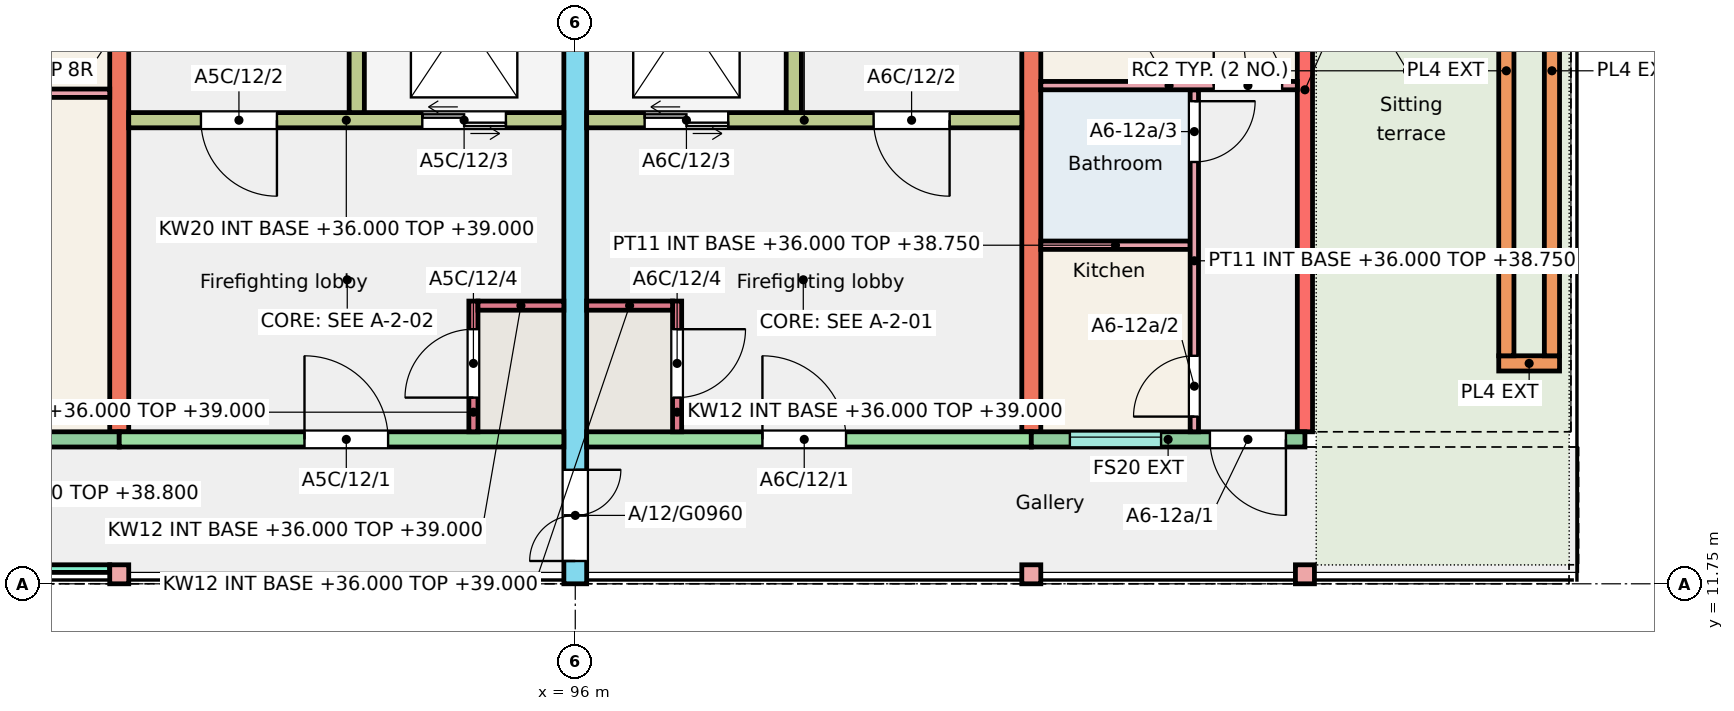
"""IFC4 building model, lengths in metres.
Left out: names, types, materials, properties, quantities, classifications, styles, units other than length and angle.
Written with IfcOpenShell. Run it as: python <this file> out.ifc"""

import sys

from ifc_helpers import new_model, si_unit, direction, frame, frame_2d, origin, origin_2d, place, context, subcontext, project, spatial, rectangle, extrude, element, fill, save


model = new_model("IFC4")
c1 = context("Model", 3, precision=1e-05, world=origin(), true_north=direction((0.0, 1.0)))
c2 = subcontext(c1, "Body", "Model", "MODEL_VIEW")
j1 = project(units=[si_unit("LENGTHUNIT", "METRE"), si_unit("PLANEANGLEUNIT", "RADIAN")], contexts=[c1])
p1 = place(None, origin())
s1 = spatial("IfcSite", under=j1, at=p1, CompositionType="ELEMENT")
p2 = place(p1, origin())
s2 = spatial("IfcBuilding", under=s1, at=p2, CompositionType="ELEMENT")
p3 = place(p2, frame((0.0, 0.0, 36.0)))
s3 = spatial("IfcBuildingStorey", under=s2, at=p3, CompositionType="ELEMENT", Elevation=36.0)
p4 = place(p3, frame((90.0, 13.75, 0.0), z_axis=(0.0, 0.0, 1.0), x_axis=(0.0, 1.0, 0.0)))
e1 = element("IfcWall", 1, at=p4, inside=s3, PredefinedType="SHEAR", context=c2, shape_type="SweptSolid", body=[
    extrude(rectangle(XDim=9.0, YDim=0.25, at=frame_2d((4.5, 0.0))), origin(), (0.0, 0.0, 1.0), 3.0),
])
p5 = place(p3, frame((96.0, 11.75, 0.0), z_axis=(0.0, 0.0, 1.0), x_axis=(0.0, 1.0, 0.0)))
e2 = element("IfcWall", 2, at=p5, inside=s3, PredefinedType="SHEAR", context=c2, shape_type="SweptSolid", body=[
    extrude(rectangle(XDim=11.0, YDim=0.3, at=frame_2d((5.5, 0.0))), origin(), (0.0, 0.0, 1.0), 3.0),
])
p6 = place(p5, frame((0.3, 0.0, 0.0)))
e3 = element("IfcOpeningElement", 3, at=p6, cuts=e2, PredefinedType="OPENING", context=c2, shape_type="SweptSolid", body=[
    extrude(rectangle(XDim=1.2, YDim=2.1, at=frame_2d((0.6, 1.05))), frame((0.0, 0.16, 0.0), z_axis=(0.0, -1.0, 0.0), x_axis=(1.0, 0.0, 0.0)), (0.0, 0.0, 1.0), 0.32),
])
p7 = place(p3, frame((102.0, 13.75, 0.0), z_axis=(0.0, 0.0, 1.0), x_axis=(0.0, 1.0, 0.0)))
e4 = element("IfcWall", 4, at=p7, inside=s3, PredefinedType="SHEAR", context=c2, shape_type="SweptSolid", body=[
    extrude(rectangle(XDim=9.0, YDim=0.25, at=frame_2d((4.5, 0.0))), origin(), (0.0, 0.0, 1.0), 3.0),
])
p8 = place(p3, frame((105.6, 13.75, 0.0), z_axis=(0.0, 0.0, 1.0), x_axis=(0.0, 1.0, 0.0)))
e5 = element("IfcWall", 5, at=p8, inside=s3, PredefinedType="SHEAR", context=c2, shape_type="SweptSolid", body=[
    extrude(rectangle(XDim=9.0, YDim=0.2, at=frame_2d((4.5, 0.0))), origin(), (0.0, 0.0, 1.0), 3.0),
])
p9 = place(p8, frame((7.603, 0.0, 0.9)))
e6 = element("IfcOpeningElement", 6, at=p9, cuts=e5, PredefinedType="OPENING", context=c2, shape_type="SweptSolid", body=[
    extrude(rectangle(XDim=1.2, YDim=1.5, at=frame_2d((0.6, 0.75))), frame((0.0, 0.11, 0.0), z_axis=(0.0, -1.0, 0.0), x_axis=(1.0, 0.0, 0.0)), (0.0, 0.0, 1.0), 0.22),
])
p10 = place(p8, frame((6.305, 0.0, 0.0)))
e7 = element("IfcOpeningElement", 7, at=p10, cuts=e5, PredefinedType="OPENING", context=c2, shape_type="SweptSolid", body=[
    extrude(rectangle(XDim=1.0, YDim=2.1, at=frame_2d((0.5, 1.05))), frame((0.0, 0.11, 0.0), z_axis=(0.0, -1.0, 0.0), x_axis=(1.0, 0.0, 0.0)), (0.0, 0.0, 1.0), 0.22),
])
p11 = place(p3, frame((86.4, 13.65, 0.0), z_axis=(0.0, 0.0, 1.0), x_axis=(1.0, 0.0, 0.0)))
e8 = element("IfcWall", 8, at=p11, inside=s3, PredefinedType="SOLIDWALL", context=c2, shape_type="SweptSolid", body=[
    extrude(rectangle(XDim=3.6, YDim=0.2, at=frame_2d((1.8, 0.0))), origin(), (0.0, 0.0, 1.0), 3.0),
])
p12 = place(p11, frame((1.188, 0.0, 0.8)))
e9 = element("IfcOpeningElement", 9, at=p12, cuts=e8, PredefinedType="OPENING", context=c2, shape_type="SweptSolid", body=[
    extrude(rectangle(XDim=1.2, YDim=1.6, at=frame_2d((0.6, 0.8))), frame((0.0, 0.11, 0.0), z_axis=(0.0, -1.0, 0.0), x_axis=(1.0, 0.0, 0.0)), (0.0, 0.0, 1.0), 0.22),
])
p13 = place(p3, frame((90.0, 13.65, 0.0), z_axis=(0.0, 0.0, 1.0), x_axis=(1.0, 0.0, 0.0)))
e10 = element("IfcWall", 10, at=p13, inside=s3, PredefinedType="SHEAR", context=c2, shape_type="SweptSolid", body=[
    extrude(rectangle(XDim=5.85, YDim=0.2, at=frame_2d((2.925, 0.0))), origin(), (0.0, 0.0, 1.0), 3.0),
])
p14 = place(p13, frame((2.438, 0.0, 0.0)))
e11 = element("IfcOpeningElement", 11, at=p14, cuts=e10, PredefinedType="OPENING", context=c2, shape_type="SweptSolid", body=[
    extrude(rectangle(XDim=1.1, YDim=2.1, at=frame_2d((0.55, 1.05))), frame((0.0, 0.11, 0.0), z_axis=(0.0, -1.0, 0.0), x_axis=(1.0, 0.0, 0.0)), (0.0, 0.0, 1.0), 0.22),
])
p15 = place(p3, frame((90.125, 17.85, 0.0), z_axis=(0.0, 0.0, 1.0), x_axis=(1.0, 0.0, 0.0)))
e12 = element("IfcWall", 12, at=p15, inside=s3, PredefinedType="SHEAR", context=c2, shape_type="SweptSolid", body=[
    extrude(rectangle(XDim=5.725, YDim=0.2, at=frame_2d((2.863, 0.0))), origin(), (0.0, 0.0, 1.0), 3.0),
])
p16 = place(p15, frame((0.95, 0.0, 0.0)))
e13 = element("IfcOpeningElement", 13, at=p16, cuts=e12, PredefinedType="OPENING", context=c2, shape_type="SweptSolid", body=[
    extrude(rectangle(XDim=1.0, YDim=2.1, at=frame_2d((0.5, 1.05))), frame((0.0, 0.11, 0.0), z_axis=(0.0, -1.0, 0.0), x_axis=(1.0, 0.0, 0.0)), (0.0, 0.0, 1.0), 0.22),
])
p17 = place(p15, frame((3.863, 0.0, 0.0)))
e14 = element("IfcOpeningElement", 14, at=p17, cuts=e12, PredefinedType="OPENING", context=c2, shape_type="SweptSolid", body=[
    extrude(rectangle(XDim=1.1, YDim=2.1, at=frame_2d((0.55, 1.05))), frame((0.0, 0.11, 0.0), z_axis=(0.0, -1.0, 0.0), x_axis=(1.0, 0.0, 0.0)), (0.0, 0.0, 1.0), 0.22),
])
p18 = place(p3, frame((93.125, 17.95, 0.0), z_axis=(0.0, 0.0, 1.0), x_axis=(0.0, 1.0, 0.0)))
e15 = element("IfcWall", 15, at=p18, inside=s3, PredefinedType="SHEAR", context=c2, shape_type="SweptSolid", body=[
    extrude(rectangle(XDim=4.8, YDim=0.2, at=frame_2d((2.4, 0.0))), origin(), (0.0, 0.0, 1.0), 3.0),
])
p19 = place(p3, frame((94.66, 13.75, 0.0), z_axis=(0.0, 0.0, 1.0), x_axis=(0.0, 1.0, 0.0)))
e16 = element("IfcWall", 16, at=p19, inside=s3, PredefinedType="SHEAR", context=c2, shape_type="SweptSolid", body=[
    extrude(rectangle(XDim=1.72, YDim=0.12, at=frame_2d((0.86, 0.0))), origin(), (0.0, 0.0, 1.0), 3.0),
])
p20 = place(p19, frame((0.45, 0.0, 0.0)))
e17 = element("IfcOpeningElement", 17, at=p20, cuts=e16, PredefinedType="OPENING", context=c2, shape_type="SweptSolid", body=[
    extrude(rectangle(XDim=0.9, YDim=2.1, at=frame_2d((0.45, 1.05))), frame((0.0, 0.07, 0.0), z_axis=(0.0, -1.0, 0.0), x_axis=(1.0, 0.0, 0.0)), (0.0, 0.0, 1.0), 0.14),
])
p21 = place(p3, frame((94.72, 15.41, 0.0), z_axis=(0.0, 0.0, 1.0), x_axis=(1.0, 0.0, 0.0)))
e18 = element("IfcWall", 18, at=p21, inside=s3, PredefinedType="SHEAR", context=c2, shape_type="SweptSolid", body=[
    extrude(rectangle(XDim=1.13, YDim=0.12, at=frame_2d((0.565, 0.0))), origin(), (0.0, 0.0, 1.0), 3.0),
])
p22 = place(p3, frame((96.15, 13.65, 0.0), z_axis=(0.0, 0.0, 1.0), x_axis=(1.0, 0.0, 0.0)))
e19 = element("IfcWall", 19, at=p22, inside=s3, PredefinedType="SHEAR", context=c2, shape_type="SweptSolid", body=[
    extrude(rectangle(XDim=5.85, YDim=0.2, at=frame_2d((2.925, 0.0))), origin(), (0.0, 0.0, 1.0), 3.0),
])
p23 = place(p22, frame((2.312, 0.0, 0.0)))
e20 = element("IfcOpeningElement", 20, at=p23, cuts=e19, PredefinedType="OPENING", context=c2, shape_type="SweptSolid", body=[
    extrude(rectangle(XDim=1.1, YDim=2.1, at=frame_2d((0.55, 1.05))), frame((0.0, 0.11, 0.0), z_axis=(0.0, -1.0, 0.0), x_axis=(1.0, 0.0, 0.0)), (0.0, 0.0, 1.0), 0.22),
])
p24 = place(p3, frame((96.15, 17.85, 0.0), z_axis=(0.0, 0.0, 1.0), x_axis=(1.0, 0.0, 0.0)))
e21 = element("IfcWall", 21, at=p24, inside=s3, PredefinedType="SHEAR", context=c2, shape_type="SweptSolid", body=[
    extrude(rectangle(XDim=5.725, YDim=0.2, at=frame_2d((2.863, 0.0))), origin(), (0.0, 0.0, 1.0), 3.0),
])
p25 = place(p24, frame((3.775, 0.0, 0.0)))
e22 = element("IfcOpeningElement", 22, at=p25, cuts=e21, PredefinedType="OPENING", context=c2, shape_type="SweptSolid", body=[
    extrude(rectangle(XDim=1.0, YDim=2.1, at=frame_2d((0.5, 1.05))), frame((0.0, 0.11, 0.0), z_axis=(0.0, -1.0, 0.0), x_axis=(1.0, 0.0, 0.0)), (0.0, 0.0, 1.0), 0.22),
])
p26 = place(p24, frame((0.762, 0.0, 0.0)))
e23 = element("IfcOpeningElement", 23, at=p26, cuts=e21, PredefinedType="OPENING", context=c2, shape_type="SweptSolid", body=[
    extrude(rectangle(XDim=1.1, YDim=2.1, at=frame_2d((0.55, 1.05))), frame((0.0, 0.11, 0.0), z_axis=(0.0, -1.0, 0.0), x_axis=(1.0, 0.0, 0.0)), (0.0, 0.0, 1.0), 0.22),
])
p27 = place(p3, frame((98.875, 17.95, 0.0), z_axis=(0.0, 0.0, 1.0), x_axis=(0.0, 1.0, 0.0)))
e24 = element("IfcWall", 24, at=p27, inside=s3, PredefinedType="SHEAR", context=c2, shape_type="SweptSolid", body=[
    extrude(rectangle(XDim=4.8, YDim=0.2, at=frame_2d((2.4, 0.0))), origin(), (0.0, 0.0, 1.0), 3.0),
])
p28 = place(p3, frame((97.34, 13.75, 0.0), z_axis=(0.0, 0.0, 1.0), x_axis=(0.0, 1.0, 0.0)))
e25 = element("IfcWall", 25, at=p28, inside=s3, PredefinedType="SHEAR", context=c2, shape_type="SweptSolid", body=[
    extrude(rectangle(XDim=1.72, YDim=0.12, at=frame_2d((0.86, 0.0))), origin(), (0.0, 0.0, 1.0), 3.0),
])
p29 = place(p28, frame((0.45, 0.0, 0.0)))
e26 = element("IfcOpeningElement", 26, at=p29, cuts=e25, PredefinedType="OPENING", context=c2, shape_type="SweptSolid", body=[
    extrude(rectangle(XDim=0.9, YDim=2.1, at=frame_2d((0.45, 1.05))), frame((0.0, 0.07, 0.0), z_axis=(0.0, -1.0, 0.0), x_axis=(1.0, 0.0, 0.0)), (0.0, 0.0, 1.0), 0.14),
])
p30 = place(p3, frame((96.15, 15.41, 0.0), z_axis=(0.0, 0.0, 1.0), x_axis=(1.0, 0.0, 0.0)))
e27 = element("IfcWall", 27, at=p30, inside=s3, PredefinedType="SHEAR", context=c2, shape_type="SweptSolid", body=[
    extrude(rectangle(XDim=1.13, YDim=0.12, at=frame_2d((0.565, 0.0))), origin(), (0.0, 0.0, 1.0), 3.0),
])
p31 = place(p3, frame((102.0, 13.65, 0.0), z_axis=(0.0, 0.0, 1.0), x_axis=(1.0, 0.0, 0.0)))
e28 = element("IfcWall", 28, at=p31, inside=s3, PredefinedType="SOLIDWALL", context=c2, shape_type="SweptSolid", body=[
    extrude(rectangle(XDim=3.6, YDim=0.2, at=frame_2d((1.8, 0.0))), origin(), (0.0, 0.0, 1.0), 3.0),
])
p32 = place(p31, frame((0.508, 0.0, 1.1)))
e29 = element("IfcOpeningElement", 29, at=p32, cuts=e28, PredefinedType="OPENING", context=c2, shape_type="SweptSolid", body=[
    extrude(rectangle(XDim=1.2, YDim=1.3, at=frame_2d((0.6, 0.65))), frame((0.0, 0.11, 0.0), z_axis=(0.0, -1.0, 0.0), x_axis=(1.0, 0.0, 0.0)), (0.0, 0.0, 1.0), 0.22),
])
p33 = place(p31, frame((2.35, 0.0, 0.0)))
e30 = element("IfcOpeningElement", 30, at=p33, cuts=e28, PredefinedType="OPENING", context=c2, shape_type="SweptSolid", body=[
    extrude(rectangle(XDim=1.0, YDim=2.1, at=frame_2d((0.5, 1.05))), frame((0.0, 0.11, 0.0), z_axis=(0.0, -1.0, 0.0), x_axis=(1.0, 0.0, 0.0)), (0.0, 0.0, 1.0), 0.22),
])
for number, where, z_axis, x_axis in (
    (31, (90.0, 11.875, 0.0), (0.0, 0.0, 1.0), (1.0, 0.0, 0.0)),
    (32, (102.0, 11.875, 0.0), (0.0, 0.0, 1.0), (1.0, 0.0, 0.0)),
    (33, (105.6, 11.875, 0.0), (0.0, 0.0, 1.0), (1.0, 0.0, 0.0)),
):
    element("IfcColumn", number, at=place(p3, frame(where, z_axis=z_axis, x_axis=x_axis)), inside=s3, PredefinedType="COLUMN", context=c2, shape_type="SweptSolid", body=[
        extrude(rectangle(XDim=0.25, YDim=0.25, at=origin_2d()), origin(), (0.0, 0.0, 1.0), 3.0),
    ])
p34 = place(p3, frame((108.15, 14.65, 0.01), z_axis=(0.0, 0.0, 1.0), x_axis=(1.0, 0.0, 0.0)))
e34 = element("IfcWall", 34, at=p34, inside=s3, PredefinedType="SOLIDWALL", context=c2, shape_type="SweptSolid", body=[
    extrude(rectangle(XDim=0.8, YDim=0.2, at=frame_2d((0.4, 0.0))), origin(), (0.0, 0.0, 1.0), 0.45),
])
for number, where, z_axis, x_axis in (
    (35, (108.25, 14.75, 0.01), (0.0, 0.0, 1.0), (0.0, 1.0, 0.0)),
    (36, (108.85, 14.75, 0.01), (0.0, 0.0, 1.0), (0.0, 1.0, 0.0)),
):
    element("IfcWall", number, at=place(p3, frame(where, z_axis=z_axis, x_axis=x_axis)), inside=s3, PredefinedType="SOLIDWALL", context=c2, shape_type="SweptSolid", body=[
        extrude(rectangle(XDim=7.5, YDim=0.2, at=frame_2d((3.75, 0.0))), origin(), (0.0, 0.0, 1.0), 0.45),
    ])
p35 = place(p3, frame((86.525, 11.95, 0.0), z_axis=(0.0, 0.0, 1.0), x_axis=(1.0, 0.0, 0.0)))
e37 = element("IfcWall", 37, at=p35, inside=s3, PredefinedType="SOLIDWALL", context=c2, shape_type="SweptSolid", body=[
    extrude(rectangle(XDim=3.35, YDim=0.1, at=frame_2d((1.675, 0.0))), origin(), (0.0, 0.0, 1.0), 2.45),
])
p36 = place(p3, frame((86.5, 18.205, 0.0), z_axis=(0.0, 0.0, 1.0), x_axis=(1.0, 0.0, 0.0)))
e38 = element("IfcWall", 38, at=p36, inside=s3, PredefinedType="PARTITIONING", context=c2, shape_type="SweptSolid", body=[
    extrude(rectangle(XDim=3.375, YDim=0.11, at=frame_2d((1.688, 0.0))), origin(), (0.0, 0.0, 1.0), 2.8),
])
p37 = place(p3, frame((102.125, 16.205, 0.0), z_axis=(0.0, 0.0, 1.0), x_axis=(1.0, 0.0, 0.0)))
e39 = element("IfcWall", 39, at=p37, inside=s3, PredefinedType="PARTITIONING", context=c2, shape_type="SweptSolid", body=[
    extrude(rectangle(XDim=1.965, YDim=0.11, at=frame_2d((0.982, 0.0))), origin(), (0.0, 0.0, 1.0), 2.75),
])
p38 = place(p3, frame((104.145, 13.75, 0.0), z_axis=(0.0, 0.0, 1.0), x_axis=(0.0, 1.0, 0.0)))
e40 = element("IfcWall", 40, at=p38, inside=s3, PredefinedType="PARTITIONING", context=c2, shape_type="SweptSolid", body=[
    extrude(rectangle(XDim=4.5, YDim=0.11, at=frame_2d((2.25, 0.0))), origin(), (0.0, 0.0, 1.0), 2.75),
])
p39 = place(p38, frame((0.2, 0.0, 0.0)))
e41 = element("IfcOpeningElement", 41, at=p39, cuts=e40, PredefinedType="OPENING", context=c2, shape_type="SweptSolid", body=[
    extrude(rectangle(XDim=0.8, YDim=2.1, at=frame_2d((0.4, 1.05))), frame((0.0, 0.065, 0.0), z_axis=(0.0, -1.0, 0.0), x_axis=(1.0, 0.0, 0.0)), (0.0, 0.0, 1.0), 0.13),
])
p40 = place(p38, frame((3.55, 0.0, 0.0)))
e42 = element("IfcOpeningElement", 42, at=p40, cuts=e40, PredefinedType="OPENING", context=c2, shape_type="SweptSolid", body=[
    extrude(rectangle(XDim=0.8, YDim=2.1, at=frame_2d((0.4, 1.05))), frame((0.0, 0.065, 0.0), z_axis=(0.0, -1.0, 0.0), x_axis=(1.0, 0.0, 0.0)), (0.0, 0.0, 1.0), 0.13),
])
p41 = place(p3, frame((102.125, 18.305, 0.0), z_axis=(0.0, 0.0, 1.0), x_axis=(1.0, 0.0, 0.0)))
e43 = element("IfcWall", 43, at=p41, inside=s3, PredefinedType="PARTITIONING", context=c2, shape_type="SweptSolid", body=[
    extrude(rectangle(XDim=3.375, YDim=0.11, at=frame_2d((1.688, 0.0))), origin(), (0.0, 0.0, 1.0), 2.75),
])
p42 = place(p41, frame((2.275, 0.0, 0.0)))
e44 = element("IfcOpeningElement", 44, at=p42, cuts=e43, PredefinedType="OPENING", context=c2, shape_type="SweptSolid", body=[
    extrude(rectangle(XDim=0.9, YDim=2.1, at=frame_2d((0.45, 1.05))), frame((0.0, 0.065, 0.0), z_axis=(0.0, -1.0, 0.0), x_axis=(1.0, 0.0, 0.0)), (0.0, 0.0, 1.0), 0.13),
])
p43 = place(p32, origin())
e45 = element("IfcWindow", 45, at=p43, inside=s3, PartitioningType="SINGLE_PANEL", PredefinedType="WINDOW", context=c2, shape_type="SweptSolid", body=[
    extrude(rectangle(XDim=1.2, YDim=1.3, at=frame_2d((0.6, 0.65))), frame((0.0, 0.06, 0.0), z_axis=(0.0, -1.0, 0.0), x_axis=(1.0, 0.0, 0.0)), (0.0, 0.0, 1.0), 0.06),
])
fill(e29, e45)
p44 = place(p33, origin())
e46 = element("IfcDoor", 46, at=p44, inside=s3, OperationType="SINGLE_SWING_RIGHT", PredefinedType="DOOR", context=c2, shape_type="SweptSolid", body=[
    extrude(rectangle(XDim=1.0, YDim=2.1, at=frame_2d((0.5, 1.05))), frame((0.0, 0.025, 0.0), z_axis=(0.0, -1.0, 0.0), x_axis=(1.0, 0.0, 0.0)), (0.0, 0.0, 1.0), 0.05),
])
fill(e30, e46)
p45 = place(p39, origin())
e47 = element("IfcDoor", 47, at=p45, inside=s3, OperationType="SINGLE_SWING_LEFT", PredefinedType="DOOR", context=c2, shape_type="SweptSolid", body=[
    extrude(rectangle(XDim=0.8, YDim=2.1, at=frame_2d((0.4, 1.05))), frame((0.0, 0.025, 0.0), z_axis=(0.0, -1.0, 0.0), x_axis=(1.0, 0.0, 0.0)), (0.0, 0.0, 1.0), 0.05),
])
fill(e41, e47)
p46 = place(p40, origin())
e48 = element("IfcDoor", 48, at=p46, inside=s3, OperationType="SINGLE_SWING_RIGHT", PredefinedType="DOOR", context=c2, shape_type="SweptSolid", body=[
    extrude(rectangle(XDim=0.8, YDim=2.1, at=frame_2d((0.4, 1.05))), frame((0.0, 0.025, 0.0), z_axis=(0.0, -1.0, 0.0), x_axis=(1.0, 0.0, 0.0)), (0.0, 0.0, 1.0), 0.05),
])
fill(e42, e48)
p47 = place(p42, origin())
e49 = element("IfcDoor", 49, at=p47, inside=s3, OperationType="SINGLE_SWING_LEFT", PredefinedType="DOOR", context=c2, shape_type="SweptSolid", body=[
    extrude(rectangle(XDim=0.9, YDim=2.1, at=frame_2d((0.45, 1.05))), frame((0.0, 0.025, 0.0), z_axis=(0.0, -1.0, 0.0), x_axis=(1.0, 0.0, 0.0)), (0.0, 0.0, 1.0), 0.05),
])
fill(e44, e49)
p48 = place(p14, origin())
e50 = element("IfcDoor", 50, at=p48, inside=s3, OperationType="SINGLE_SWING_LEFT", PredefinedType="DOOR", context=c2, shape_type="SweptSolid", body=[
    extrude(rectangle(XDim=1.1, YDim=2.1, at=frame_2d((0.55, 1.05))), frame((0.0, 0.025, 0.0), z_axis=(0.0, -1.0, 0.0), x_axis=(1.0, 0.0, 0.0)), (0.0, 0.0, 1.0), 0.05),
])
fill(e11, e50)
p49 = place(p16, origin())
e51 = element("IfcDoor", 51, at=p49, inside=s3, OperationType="SINGLE_SWING_RIGHT", PredefinedType="DOOR", context=c2, shape_type="SweptSolid", body=[
    extrude(rectangle(XDim=1.0, YDim=2.1, at=frame_2d((0.5, 1.05))), frame((0.0, 0.025, 0.0), z_axis=(0.0, -1.0, 0.0), x_axis=(1.0, 0.0, 0.0)), (0.0, 0.0, 1.0), 0.05),
])
fill(e13, e51)
p50 = place(p17, origin())
e52 = element("IfcDoor", 52, at=p50, inside=s3, OperationType="DOUBLE_DOOR_SLIDING", PredefinedType="DOOR", context=c2, shape_type="SweptSolid", body=[
    extrude(rectangle(XDim=1.1, YDim=2.1, at=frame_2d((0.55, 1.05))), frame((0.0, 0.025, 0.0), z_axis=(0.0, -1.0, 0.0), x_axis=(1.0, 0.0, 0.0)), (0.0, 0.0, 1.0), 0.05),
])
fill(e14, e52)
p51 = place(p20, origin())
e53 = element("IfcDoor", 53, at=p51, inside=s3, OperationType="SINGLE_SWING_LEFT", PredefinedType="DOOR", context=c2, shape_type="SweptSolid", body=[
    extrude(rectangle(XDim=0.9, YDim=2.1, at=frame_2d((0.45, 1.05))), frame((0.0, 0.025, 0.0), z_axis=(0.0, -1.0, 0.0), x_axis=(1.0, 0.0, 0.0)), (0.0, 0.0, 1.0), 0.05),
])
fill(e17, e53)
p52 = place(p23, origin())
e54 = element("IfcDoor", 54, at=p52, inside=s3, OperationType="SINGLE_SWING_LEFT", PredefinedType="DOOR", context=c2, shape_type="SweptSolid", body=[
    extrude(rectangle(XDim=1.1, YDim=2.1, at=frame_2d((0.55, 1.05))), frame((0.0, 0.025, 0.0), z_axis=(0.0, -1.0, 0.0), x_axis=(1.0, 0.0, 0.0)), (0.0, 0.0, 1.0), 0.05),
])
fill(e20, e54)
p53 = place(p25, origin())
e55 = element("IfcDoor", 55, at=p53, inside=s3, OperationType="SINGLE_SWING_RIGHT", PredefinedType="DOOR", context=c2, shape_type="SweptSolid", body=[
    extrude(rectangle(XDim=1.0, YDim=2.1, at=frame_2d((0.5, 1.05))), frame((0.0, 0.025, 0.0), z_axis=(0.0, -1.0, 0.0), x_axis=(1.0, 0.0, 0.0)), (0.0, 0.0, 1.0), 0.05),
])
fill(e22, e55)
p54 = place(p26, origin())
e56 = element("IfcDoor", 56, at=p54, inside=s3, OperationType="DOUBLE_DOOR_SLIDING", PredefinedType="DOOR", context=c2, shape_type="SweptSolid", body=[
    extrude(rectangle(XDim=1.1, YDim=2.1, at=frame_2d((0.55, 1.05))), frame((0.0, 0.025, 0.0), z_axis=(0.0, -1.0, 0.0), x_axis=(1.0, 0.0, 0.0)), (0.0, 0.0, 1.0), 0.05),
])
fill(e23, e56)
p55 = place(p29, origin())
e57 = element("IfcDoor", 57, at=p55, inside=s3, OperationType="SINGLE_SWING_RIGHT", PredefinedType="DOOR", context=c2, shape_type="SweptSolid", body=[
    extrude(rectangle(XDim=0.9, YDim=2.1, at=frame_2d((0.45, 1.05))), frame((0.0, 0.025, 0.0), z_axis=(0.0, -1.0, 0.0), x_axis=(1.0, 0.0, 0.0)), (0.0, 0.0, 1.0), 0.05),
])
fill(e26, e57)
p56 = place(p6, origin())
e58 = element("IfcDoor", 58, at=p56, inside=s3, OperationType="DOUBLE_DOOR_SINGLE_SWING", PredefinedType="DOOR", context=c2, shape_type="SweptSolid", body=[
    extrude(rectangle(XDim=1.2, YDim=2.1, at=frame_2d((0.6, 1.05))), frame((0.0, 0.025, 0.0), z_axis=(0.0, -1.0, 0.0), x_axis=(1.0, 0.0, 0.0)), (0.0, 0.0, 1.0), 0.05),
])
fill(e3, e58)
save(model, sys.argv[1])
